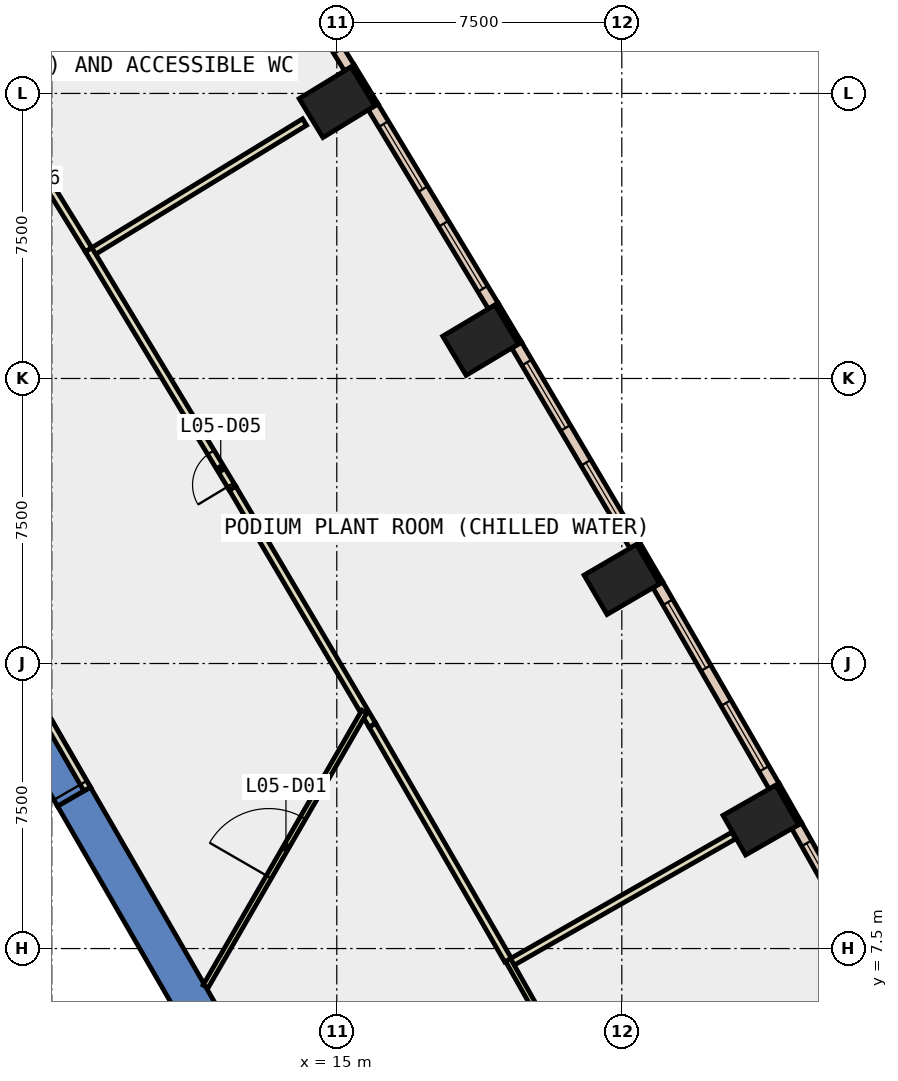
"""IFC4 building model, lengths in metres.
Left out: names, types, materials, properties, quantities, classifications, styles, units other than length and angle.
Written with IfcOpenShell. Run it as: python <this file> out.ifc"""

import sys

from ifc_helpers import new_model, si_unit, direction, frame, frame_2d, origin, origin_2d, place, context, subcontext, project, spatial, polyline, rectangle, outline, extrude, element, fill, save


model = new_model("IFC4")
c1 = context("Model", 3, precision=1e-05, world=origin(), true_north=direction((0.0, 1.0)))
c2 = subcontext(c1, "Body", "Model", "MODEL_VIEW")
j1 = project(units=[si_unit("LENGTHUNIT", "METRE"), si_unit("PLANEANGLEUNIT", "RADIAN")], contexts=[c1])
p1 = place(None, origin())
s1 = spatial("IfcSite", under=j1, at=p1, CompositionType="ELEMENT")
p2 = place(p1, origin())
s2 = spatial("IfcBuilding", under=s1, at=p2, CompositionType="ELEMENT")
p3 = place(p2, frame((0.0, 0.0, 30.0)))
s3 = spatial("IfcBuildingStorey", under=s2, at=p3, CompositionType="ELEMENT", Elevation=30.0)
for number, where, z_axis, x_axis in (
    (1, (26.155, 10.88, -0.45), (0.0, 0.0, 1.0), (-0.496, 0.869, 0.0)),
    (2, (22.5, 17.211, -0.45), (0.0, 0.0, 1.0), (-0.504, 0.864, 0.0)),
    (3, (18.782, 23.508, -0.45), (0.0, 0.0, 1.0), (-0.513, 0.858, 0.0)),
    (4, (15.005, 29.769, -0.45), (0.0, 0.0, 1.0), (-0.522, 0.853, 0.0)),
):
    element("IfcColumn", number, at=place(p3, frame(where, z_axis=z_axis, x_axis=x_axis)), inside=s3, PredefinedType="COLUMN", context=c2, shape_type="SweptSolid", body=[
        extrude(rectangle(XDim=1.2, YDim=1.6, at=origin_2d()), origin(), (0.0, 0.0, 1.0), 4.85),
    ])
p4 = place(p3, frame((0.0, 0.0, -0.45)))
e5 = element("IfcWall", 5, at=p4, inside=s3, PredefinedType="SHEAR", context=c2, shape_type="SweptSolid", body=[
    extrude(outline(polyline([(8.517, 11.748), (7.651, 11.248), (12.702, 2.5), (13.856, 2.5), (8.517, 11.748)])), origin(), (0.0, 0.0, 1.0), 4.85),
])
p5 = place(p3, frame((0.0, 0.0, 3.6)))
e6 = element("IfcWall", 6, at=p5, inside=s3, PredefinedType="SHEAR", context=c2, shape_type="SweptSolid", body=[
    extrude(outline(polyline([(7.517, 13.48), (6.651, 12.98), (7.651, 11.248), (8.517, 11.748), (7.517, 13.48)])), origin(), (0.0, 0.0, 1.0), 0.8),
])
p6 = place(p3, frame((27.191, 10.78, 0.0), z_axis=(0.0, 0.0, 1.0), x_axis=(-0.495854054996, 0.868405870629, 0.0)))
e7 = element("IfcWall", 7, at=p6, inside=s3, PredefinedType="STANDARD", context=c2, shape_type="SweptSolid", body=[
    extrude(rectangle(XDim=1.2, YDim=0.1, at=frame_2d((0.6, 0.0))), origin(), (0.0, 0.0, 1.0), 4.4),
])
p7 = place(p3, frame((23.536, 17.122, 0.0), z_axis=(0.0, 0.0, 1.0), x_axis=(-0.504313844903, 0.863520437418, 0.0)))
e8 = element("IfcWall", 8, at=p7, inside=s3, PredefinedType="STANDARD", context=c2, shape_type="SweptSolid", body=[
    extrude(rectangle(XDim=1.2, YDim=0.1, at=frame_2d((0.6, 0.0))), origin(), (0.0, 0.0, 1.0), 4.4),
])
p8 = place(p3, frame((19.82, 23.429, 0.0), z_axis=(0.0, 0.0, 1.0), x_axis=(-0.513238760752, 0.858245870635, 0.0)))
e9 = element("IfcWall", 9, at=p8, inside=s3, PredefinedType="STANDARD", context=c2, shape_type="SweptSolid", body=[
    extrude(rectangle(XDim=1.2, YDim=0.1, at=frame_2d((0.6, 0.0))), origin(), (0.0, 0.0, 1.0), 4.4),
])
p9 = place(p3, frame((16.043, 29.7, 0.0), z_axis=(0.0, 0.0, 1.0), x_axis=(-0.521507599072, 0.853246637327, 0.0)))
e10 = element("IfcWall", 10, at=p9, inside=s3, PredefinedType="STANDARD", context=c2, shape_type="SweptSolid", body=[
    extrude(rectangle(XDim=1.2, YDim=0.1, at=frame_2d((0.6, 0.0))), origin(), (0.0, 0.0, 1.0), 4.4),
])
p10 = place(p3, frame((30.111, 5.399, 0.0), z_axis=(0.0, 0.0, 1.0), x_axis=(-0.491661677717, 0.870786308267, 0.0)))
e11 = element("IfcWall", 11, at=p10, inside=s3, PredefinedType="STANDARD", context=c2, shape_type="SweptSolid", body=[
    extrude(rectangle(XDim=6.122, YDim=0.3, at=frame_2d((3.061, 0.0))), origin(), (0.0, 0.0, 1.0), 4.4),
])
p11 = place(p10, frame((0.531, 0.0, 1.0)))
e12 = element("IfcOpeningElement", 12, at=p11, cuts=e11, PredefinedType="OPENING", context=c2, shape_type="SweptSolid", body=[
    extrude(rectangle(XDim=2.0, YDim=3.2, at=frame_2d((1.0, 1.6))), frame((0.0, 0.16, 0.0), z_axis=(0.0, -1.0, 0.0), x_axis=(1.0, 0.0, 0.0)), (0.0, 0.0, 1.0), 0.32),
])
p12 = place(p10, frame((3.592, 0.0, 1.0)))
e13 = element("IfcOpeningElement", 13, at=p12, cuts=e11, PredefinedType="OPENING", context=c2, shape_type="SweptSolid", body=[
    extrude(rectangle(XDim=2.0, YDim=3.2, at=frame_2d((1.0, 1.6))), frame((0.0, 0.16, 0.0), z_axis=(0.0, -1.0, 0.0), x_axis=(1.0, 0.0, 0.0)), (0.0, 0.0, 1.0), 0.32),
])
p13 = place(p3, frame((26.507, 11.77, 0.0), z_axis=(0.0, 0.0, 1.0), x_axis=(-0.499939977436, 0.866060055055, 0.0)))
e14 = element("IfcWall", 14, at=p13, inside=s3, PredefinedType="STANDARD", context=c2, shape_type="SweptSolid", body=[
    extrude(rectangle(XDim=6.121, YDim=0.3, at=frame_2d((3.061, 0.0))), origin(), (0.0, 0.0, 1.0), 4.4),
])
p14 = place(p13, frame((0.53, 0.0, 1.0)))
e15 = element("IfcOpeningElement", 15, at=p14, cuts=e14, PredefinedType="OPENING", context=c2, shape_type="SweptSolid", body=[
    extrude(rectangle(XDim=2.0, YDim=3.2, at=frame_2d((1.0, 1.6))), frame((0.0, 0.16, 0.0), z_axis=(0.0, -1.0, 0.0), x_axis=(1.0, 0.0, 0.0)), (0.0, 0.0, 1.0), 0.32),
])
p15 = place(p13, frame((3.591, 0.0, 1.0)))
e16 = element("IfcOpeningElement", 16, at=p15, cuts=e14, PredefinedType="OPENING", context=c2, shape_type="SweptSolid", body=[
    extrude(rectangle(XDim=2.0, YDim=3.2, at=frame_2d((1.0, 1.6))), frame((0.0, 0.16, 0.0), z_axis=(0.0, -1.0, 0.0), x_axis=(1.0, 0.0, 0.0)), (0.0, 0.0, 1.0), 0.32),
])
p16 = place(p3, frame((22.843, 18.105, 0.0), z_axis=(0.0, 0.0, 1.0), x_axis=(-0.50834231483, 0.861155091115, 0.0)))
e17 = element("IfcWall", 17, at=p16, inside=s3, PredefinedType="STANDARD", context=c2, shape_type="SweptSolid", body=[
    extrude(rectangle(XDim=6.122, YDim=0.3, at=frame_2d((3.061, 0.0))), origin(), (0.0, 0.0, 1.0), 4.4),
])
p17 = place(p16, frame((0.53, 0.0, 1.0)))
e18 = element("IfcOpeningElement", 18, at=p17, cuts=e17, PredefinedType="OPENING", context=c2, shape_type="SweptSolid", body=[
    extrude(rectangle(XDim=2.0, YDim=3.2, at=frame_2d((1.0, 1.6))), frame((0.0, 0.16, 0.0), z_axis=(0.0, -1.0, 0.0), x_axis=(1.0, 0.0, 0.0)), (0.0, 0.0, 1.0), 0.32),
])
p18 = place(p16, frame((3.591, 0.0, 1.0)))
e19 = element("IfcOpeningElement", 19, at=p18, cuts=e17, PredefinedType="OPENING", context=c2, shape_type="SweptSolid", body=[
    extrude(rectangle(XDim=2.0, YDim=3.2, at=frame_2d((1.0, 1.6))), frame((0.0, 0.16, 0.0), z_axis=(0.0, -1.0, 0.0), x_axis=(1.0, 0.0, 0.0)), (0.0, 0.0, 1.0), 0.32),
])
p19 = place(p3, frame((19.117, 24.406, 0.0), z_axis=(0.0, 0.0, 1.0), x_axis=(-0.516687651362, 0.85617397235, 0.0)))
e20 = element("IfcWall", 20, at=p19, inside=s3, PredefinedType="STANDARD", context=c2, shape_type="SweptSolid", body=[
    extrude(rectangle(XDim=6.121, YDim=0.3, at=frame_2d((3.061, 0.0))), origin(), (0.0, 0.0, 1.0), 4.4),
])
p20 = place(p19, frame((0.53, 0.0, 1.0)))
e21 = element("IfcOpeningElement", 21, at=p20, cuts=e20, PredefinedType="OPENING", context=c2, shape_type="SweptSolid", body=[
    extrude(rectangle(XDim=2.0, YDim=3.2, at=frame_2d((1.0, 1.6))), frame((0.0, 0.16, 0.0), z_axis=(0.0, -1.0, 0.0), x_axis=(1.0, 0.0, 0.0)), (0.0, 0.0, 1.0), 0.32),
])
p21 = place(p19, frame((3.591, 0.0, 1.0)))
e22 = element("IfcOpeningElement", 22, at=p21, cuts=e20, PredefinedType="OPENING", context=c2, shape_type="SweptSolid", body=[
    extrude(rectangle(XDim=2.0, YDim=3.2, at=frame_2d((1.0, 1.6))), frame((0.0, 0.16, 0.0), z_axis=(0.0, -1.0, 0.0), x_axis=(1.0, 0.0, 0.0)), (0.0, 0.0, 1.0), 0.32),
])
p22 = place(p3, frame((15.331, 30.67, 0.0), z_axis=(0.0, 0.0, 1.0), x_axis=(-0.524953701886, 0.85113078365, 0.0)))
e23 = element("IfcWall", 23, at=p22, inside=s3, PredefinedType="STANDARD", context=c2, shape_type="SweptSolid", body=[
    extrude(rectangle(XDim=6.123, YDim=0.3, at=frame_2d((3.061, 0.0))), origin(), (0.0, 0.0, 1.0), 4.4),
])
p23 = place(p22, frame((0.531, 0.0, 1.0)))
e24 = element("IfcOpeningElement", 24, at=p23, cuts=e23, PredefinedType="OPENING", context=c2, shape_type="SweptSolid", body=[
    extrude(rectangle(XDim=2.0, YDim=3.2, at=frame_2d((1.0, 1.6))), frame((0.0, 0.16, 0.0), z_axis=(0.0, -1.0, 0.0), x_axis=(1.0, 0.0, 0.0)), (0.0, 0.0, 1.0), 0.32),
])
p24 = place(p22, frame((3.592, 0.0, 1.0)))
e25 = element("IfcOpeningElement", 25, at=p24, cuts=e23, PredefinedType="OPENING", context=c2, shape_type="SweptSolid", body=[
    extrude(rectangle(XDim=2.0, YDim=3.2, at=frame_2d((1.0, 1.6))), frame((0.0, 0.16, 0.0), z_axis=(0.0, -1.0, 0.0), x_axis=(1.0, 0.0, 0.0)), (0.0, 0.0, 1.0), 0.32),
])
p25 = place(p3, frame((19.554, 7.113, 0.0), z_axis=(0.0, 0.0, 1.0), x_axis=(0.868584181489, 0.495541642718, 0.0)))
e26 = element("IfcWall", 26, at=p25, inside=s3, PredefinedType="PARTITIONING", context=c2, shape_type="SweptSolid", body=[
    extrude(rectangle(XDim=6.78, YDim=0.2, at=frame_2d((3.39, 0.0))), origin(), (0.0, 0.0, 1.0), 4.4),
])
p26 = place(p3, frame((23.114, 0.807, 0.0), z_axis=(0.0, 0.0, 1.0), x_axis=(-0.491539851918, 0.870855082075, 0.0)))
e27 = element("IfcWall", 27, at=p26, inside=s3, PredefinedType="PARTITIONING", context=c2, shape_type="SweptSolid", body=[
    extrude(rectangle(XDim=7.34, YDim=0.15, at=frame_2d((3.67, 0.0))), origin(), (0.0, 0.0, 1.0), 4.4),
])
p27 = place(p3, frame((8.52, 25.804, 0.0), z_axis=(0.0, 0.0, 1.0), x_axis=(0.853194970622, 0.521592122358, 0.0)))
e28 = element("IfcWall", 28, at=p27, inside=s3, PredefinedType="PARTITIONING", context=c2, shape_type="SweptSolid", body=[
    extrude(rectangle(XDim=6.601, YDim=0.2, at=frame_2d((3.301, 0.0))), origin(), (0.0, 0.0, 1.0), 4.4),
])
p28 = place(p3, frame((19.505, 7.198, 0.0), z_axis=(0.0, 0.0, 1.0), x_axis=(-0.500031381659, 0.866007284817, 0.0)))
e29 = element("IfcWall", 29, at=p28, inside=s3, PredefinedType="PARTITIONING", context=c2, shape_type="SweptSolid", body=[
    extrude(rectangle(XDim=7.137, YDim=0.2, at=frame_2d((3.569, 0.0))), origin(), (0.0, 0.0, 1.0), 4.4),
])
p29 = place(p3, frame((15.936, 13.379, 0.0), z_axis=(0.0, 0.0, 1.0), x_axis=(-0.508273674393, 0.861195606073, 0.0)))
e30 = element("IfcWall", 30, at=p29, inside=s3, PredefinedType="PARTITIONING", context=c2, shape_type="SweptSolid", body=[
    extrude(rectangle(XDim=7.24, YDim=0.2, at=frame_2d((3.62, 0.0))), origin(), (0.0, 0.0, 1.0), 4.4),
])
p30 = place(p3, frame((12.256, 19.614, 0.0), z_axis=(0.0, 0.0, 1.0), x_axis=(-0.516756729015, 0.856132281261, 0.0)))
e31 = element("IfcWall", 31, at=p30, inside=s3, PredefinedType="PARTITIONING", context=c2, shape_type="SweptSolid", body=[
    extrude(rectangle(XDim=7.331, YDim=0.2, at=frame_2d((3.665, 0.0))), origin(), (0.0, 0.0, 1.0), 4.4),
])
p31 = place(p30, frame((0.1, 0.0, 0.0)))
e32 = element("IfcOpeningElement", 32, at=p31, cuts=e31, PredefinedType="OPENING", context=c2, shape_type="SweptSolid", body=[
    extrude(rectangle(XDim=1.0, YDim=2.1, at=frame_2d((0.5, 1.05))), frame((0.0, 0.11, 0.0), z_axis=(0.0, -1.0, 0.0), x_axis=(1.0, 0.0, 0.0)), (0.0, 0.0, 1.0), 0.22),
])
p32 = place(p3, frame((8.467, 25.89, 0.0), z_axis=(0.0, 0.0, 1.0), x_axis=(-0.524768238136, 0.851245144623, 0.0)))
e33 = element("IfcWall", 33, at=p32, inside=s3, PredefinedType="PARTITIONING", context=c2, shape_type="SweptSolid", body=[
    extrude(rectangle(XDim=7.146, YDim=0.2, at=frame_2d((3.573, 0.0))), origin(), (0.0, 0.0, 1.0), 4.4),
])
p33 = place(p32, frame((2.981, 0.0, 0.0)))
e34 = element("IfcOpeningElement", 34, at=p33, cuts=e33, PredefinedType="OPENING", context=c2, shape_type="SweptSolid", body=[
    extrude(rectangle(XDim=1.0, YDim=2.1, at=frame_2d((0.5, 1.05))), frame((0.0, 0.11, 0.0), z_axis=(0.0, -1.0, 0.0), x_axis=(1.0, 0.0, 0.0)), (0.0, 0.0, 1.0), 0.22),
])
p34 = place(p3, frame((11.547, 6.5, 0.0), z_axis=(0.0, 0.0, 1.0), x_axis=(0.500020059357, 0.866013822199, 0.0)))
e35 = element("IfcWall", 35, at=p34, inside=s3, PredefinedType="PARTITIONING", context=c2, shape_type="SweptSolid", body=[
    extrude(rectangle(XDim=8.356, YDim=0.15, at=frame_2d((4.178, 0.0))), origin(), (0.0, 0.0, 1.0), 4.4),
])
p35 = place(p34, frame((3.33, 0.0, 0.0)))
e36 = element("IfcOpeningElement", 36, at=p35, cuts=e35, PredefinedType="OPENING", context=c2, shape_type="SweptSolid", body=[
    extrude(rectangle(XDim=1.8, YDim=2.1, at=frame_2d((0.9, 1.05))), frame((0.0, 0.085, 0.0), z_axis=(0.0, -1.0, 0.0), x_axis=(1.0, 0.0, 0.0)), (0.0, 0.0, 1.0), 0.17),
])
p36 = place(p3, frame((8.43, 11.698, 0.0), z_axis=(0.0, 0.0, 1.0), x_axis=(-0.50002537861, 0.866010750942, 0.0)))
e37 = element("IfcWall", 37, at=p36, inside=s3, PredefinedType="PARTITIONING", context=c2, shape_type="SweptSolid", body=[
    extrude(rectangle(XDim=2.0, YDim=0.2, at=frame_2d((1.0, 0.0))), origin(), (0.0, 0.0, 1.0), 2.4),
])
p37 = place(p36, frame((0.19, 0.0, 0.0)))
e38 = element("IfcOpeningElement", 38, at=p37, cuts=e37, PredefinedType="OPENING", context=c2, shape_type="SweptSolid", body=[
    extrude(rectangle(XDim=1.8, YDim=2.1, at=frame_2d((0.9, 1.05))), frame((0.0, 0.11, 0.0), z_axis=(0.0, -1.0, 0.0), x_axis=(1.0, 0.0, 0.0)), (0.0, 0.0, 1.0), 0.22),
])
p38 = place(p3, frame((8.48, 3.412, 0.0), z_axis=(0.0, 0.0, 1.0), x_axis=(-0.499978703459, 0.866037698999, 0.0)))
e39 = element("IfcWall", 39, at=p38, inside=s3, PredefinedType="STANDARD", context=c2, shape_type="SweptSolid", body=[
    extrude(rectangle(XDim=6.9, YDim=0.2, at=frame_2d((3.45, 0.0))), origin(), (0.0, 0.0, 1.0), 4.4),
])
p39 = place(p12, origin())
e40 = element("IfcWindow", 40, at=p39, inside=s3, PartitioningType="SINGLE_PANEL", PredefinedType="WINDOW", context=c2, shape_type="SweptSolid", body=[
    extrude(rectangle(XDim=2.0, YDim=3.2, at=frame_2d((1.0, 1.6))), frame((0.0, 0.03, 0.0), z_axis=(0.0, -1.0, 0.0), x_axis=(1.0, 0.0, 0.0)), (0.0, 0.0, 1.0), 0.06),
])
fill(e13, e40)
p40 = place(p14, origin())
e41 = element("IfcWindow", 41, at=p40, inside=s3, PartitioningType="SINGLE_PANEL", PredefinedType="WINDOW", context=c2, shape_type="SweptSolid", body=[
    extrude(rectangle(XDim=2.0, YDim=3.2, at=frame_2d((1.0, 1.6))), frame((0.0, 0.03, 0.0), z_axis=(0.0, -1.0, 0.0), x_axis=(1.0, 0.0, 0.0)), (0.0, 0.0, 1.0), 0.06),
])
fill(e15, e41)
p41 = place(p15, origin())
e42 = element("IfcWindow", 42, at=p41, inside=s3, PartitioningType="SINGLE_PANEL", PredefinedType="WINDOW", context=c2, shape_type="SweptSolid", body=[
    extrude(rectangle(XDim=2.0, YDim=3.2, at=frame_2d((1.0, 1.6))), frame((0.0, 0.03, 0.0), z_axis=(0.0, -1.0, 0.0), x_axis=(1.0, 0.0, 0.0)), (0.0, 0.0, 1.0), 0.06),
])
fill(e16, e42)
p42 = place(p17, origin())
e43 = element("IfcWindow", 43, at=p42, inside=s3, PartitioningType="SINGLE_PANEL", PredefinedType="WINDOW", context=c2, shape_type="SweptSolid", body=[
    extrude(rectangle(XDim=2.0, YDim=3.2, at=frame_2d((1.0, 1.6))), frame((0.0, 0.03, 0.0), z_axis=(0.0, -1.0, 0.0), x_axis=(1.0, 0.0, 0.0)), (0.0, 0.0, 1.0), 0.06),
])
fill(e18, e43)
p43 = place(p18, origin())
e44 = element("IfcWindow", 44, at=p43, inside=s3, PartitioningType="SINGLE_PANEL", PredefinedType="WINDOW", context=c2, shape_type="SweptSolid", body=[
    extrude(rectangle(XDim=2.0, YDim=3.2, at=frame_2d((1.0, 1.6))), frame((0.0, 0.03, 0.0), z_axis=(0.0, -1.0, 0.0), x_axis=(1.0, 0.0, 0.0)), (0.0, 0.0, 1.0), 0.06),
])
fill(e19, e44)
p44 = place(p20, origin())
e45 = element("IfcWindow", 45, at=p44, inside=s3, PartitioningType="SINGLE_PANEL", PredefinedType="WINDOW", context=c2, shape_type="SweptSolid", body=[
    extrude(rectangle(XDim=2.0, YDim=3.2, at=frame_2d((1.0, 1.6))), frame((0.0, 0.03, 0.0), z_axis=(0.0, -1.0, 0.0), x_axis=(1.0, 0.0, 0.0)), (0.0, 0.0, 1.0), 0.06),
])
fill(e21, e45)
p45 = place(p21, origin())
e46 = element("IfcWindow", 46, at=p45, inside=s3, PartitioningType="SINGLE_PANEL", PredefinedType="WINDOW", context=c2, shape_type="SweptSolid", body=[
    extrude(rectangle(XDim=2.0, YDim=3.2, at=frame_2d((1.0, 1.6))), frame((0.0, 0.03, 0.0), z_axis=(0.0, -1.0, 0.0), x_axis=(1.0, 0.0, 0.0)), (0.0, 0.0, 1.0), 0.06),
])
fill(e22, e46)
p46 = place(p35, origin())
e47 = element("IfcDoor", 47, at=p46, inside=s3, OperationType="DOUBLE_DOOR_SINGLE_SWING", PredefinedType="DOOR", context=c2, shape_type="SweptSolid", body=[
    extrude(rectangle(XDim=1.8, YDim=2.1, at=frame_2d((0.9, 1.05))), frame((0.0, 0.025, 0.0), z_axis=(0.0, -1.0, 0.0), x_axis=(1.0, 0.0, 0.0)), (0.0, 0.0, 1.0), 0.05),
])
fill(e36, e47)
p47 = place(p31, origin())
e48 = element("IfcDoor", 48, at=p47, inside=s3, OperationType="SINGLE_SWING_RIGHT", PredefinedType="DOOR", context=c2, shape_type="SweptSolid", body=[
    extrude(rectangle(XDim=1.0, YDim=2.1, at=frame_2d((0.5, 1.05))), frame((0.0, 0.025, 0.0), z_axis=(0.0, -1.0, 0.0), x_axis=(1.0, 0.0, 0.0)), (0.0, 0.0, 1.0), 0.05),
])
fill(e32, e48)
p48 = place(p37, origin())
e49 = element("IfcDoor", 49, at=p48, inside=s3, OperationType="DOUBLE_DOOR_SINGLE_SWING", PredefinedType="DOOR", context=c2, shape_type="SweptSolid", body=[
    extrude(rectangle(XDim=1.8, YDim=2.1, at=frame_2d((0.9, 1.05))), frame((0.0, 0.025, 0.0), z_axis=(0.0, -1.0, 0.0), x_axis=(1.0, 0.0, 0.0)), (0.0, 0.0, 1.0), 0.05),
])
fill(e38, e49)
save(model, sys.argv[1])
